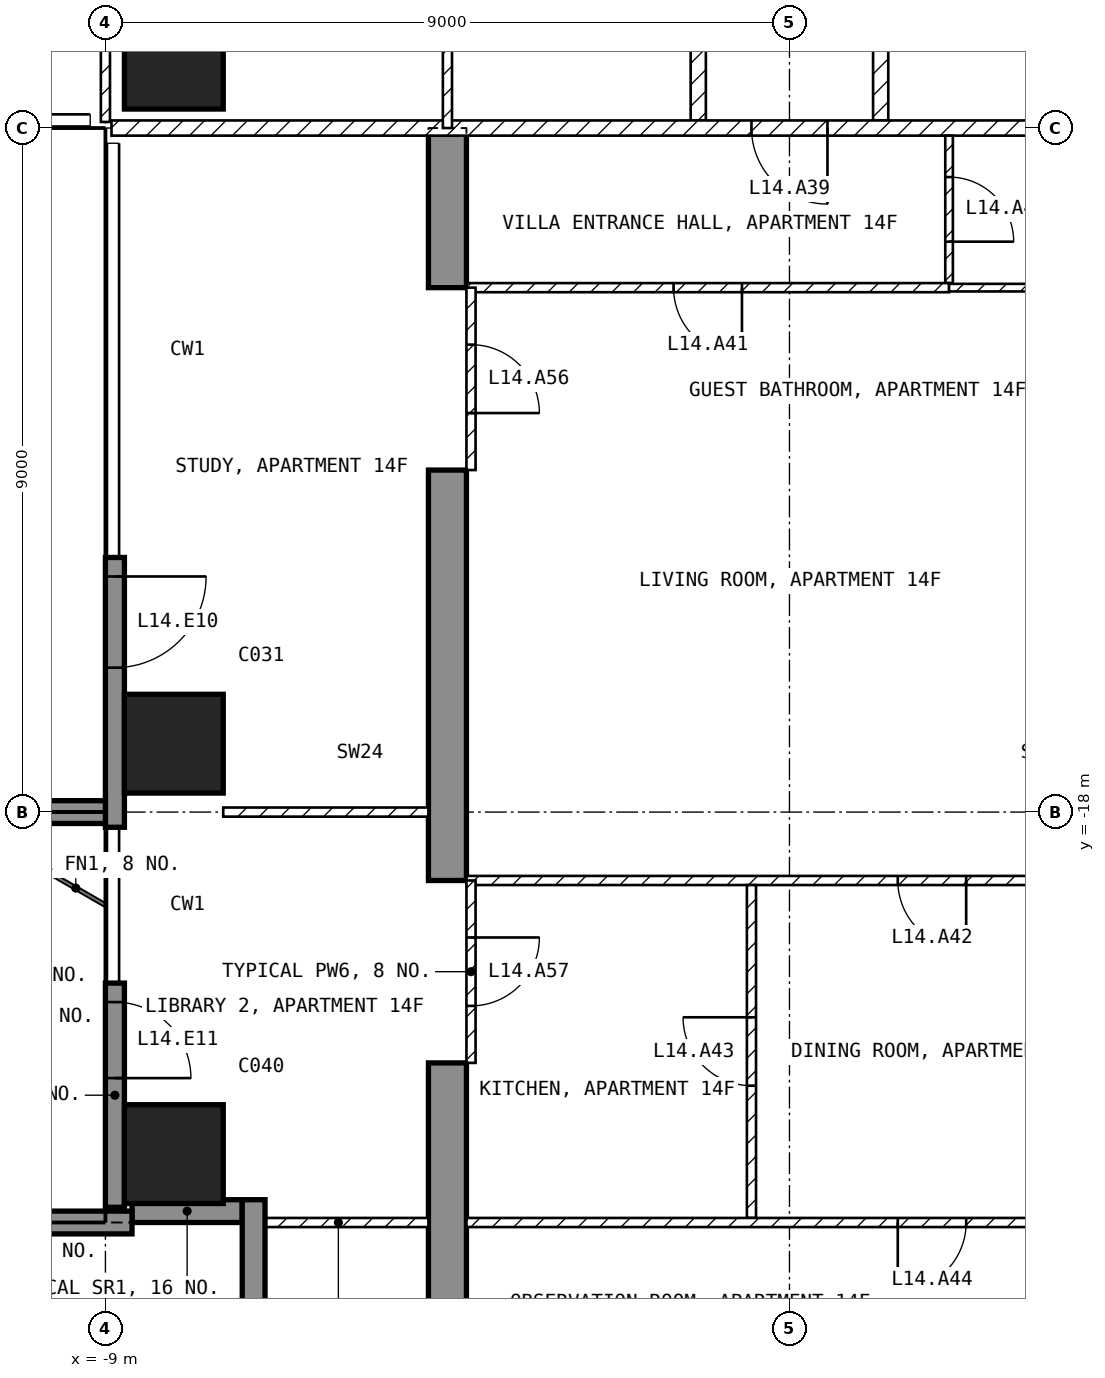
"""IFC4 building model, lengths in metres.
Left out: names, types, materials, properties, quantities, classifications, styles, units other than length and angle.
Written with IfcOpenShell. Run it as: python <this file> out.ifc"""

import sys

from ifc_helpers import new_model, si_unit, direction, frame, frame_2d, origin, origin_2d, place, context, subcontext, project, spatial, polyline, rectangle, outline, extrude, element, fill, save


model = new_model("IFC4")
c1 = context("Model", 3, precision=1e-05, world=origin(), true_north=direction((0.0, 1.0)))
c2 = subcontext(c1, "Body", "Model", "MODEL_VIEW")
j1 = project(units=[si_unit("LENGTHUNIT", "METRE"), si_unit("PLANEANGLEUNIT", "RADIAN")], contexts=[c1])
p1 = place(None, origin())
s1 = spatial("IfcSite", under=j1, at=p1, CompositionType="ELEMENT")
p2 = place(p1, origin())
s2 = spatial("IfcBuilding", under=s1, at=p2, CompositionType="ELEMENT")
p3 = place(p2, frame((0.0, 0.0, 68.0)))
s3 = spatial("IfcBuildingStorey", under=s2, at=p3, CompositionType="ELEMENT", Elevation=68.0)
for number, where, z_axis, x_axis in (
    (1, (-8.1, -22.5, -0.25), (0.0, 0.0, 1.0), (1.0, 0.0, 0.0)),
    (2, (-8.1, -17.1, -0.25), (0.0, 0.0, 1.0), (1.0, 0.0, 0.0)),
    (3, (-8.1, -8.1, -0.25), (0.0, 0.0, 1.0), (1.0, 0.0, 0.0)),
):
    element("IfcColumn", number, at=place(p3, frame(where, z_axis=z_axis, x_axis=x_axis)), inside=s3, PredefinedType="COLUMN", context=c2, shape_type="SweptSolid", body=[
        extrude(rectangle(XDim=1.3, YDim=1.3, at=origin_2d()), origin(), (0.0, 0.0, 1.0), 3.5),
    ])
p4 = place(p3, frame((-4.75, -25.45, -0.25), z_axis=(1.0, 0.0, 0.0), x_axis=(0.0, 1.0, 0.0)))
e4 = element("IfcWall", 4, at=p4, inside=s3, PredefinedType="SHEAR", context=c2, shape_type="SweptSolid", body=[
    extrude(outline(polyline([(0.0, 0.0), (4.15, 0.0), (4.15, 2.65), (6.55, 2.65), (6.55, 0.0), (11.95, 0.0), (11.95, 2.65), (14.35, 2.65), (14.35, 0.0), (16.45, 0.0), (16.45, 3.5), (0.0, 3.5), (0.0, 0.0)])), origin(), (0.0, 0.0, 1.0), 0.5),
])
p5 = place(p3, frame((-8.875, -14.65, 0.0), z_axis=(0.0, 0.0, 1.0), x_axis=(0.0, -1.0, 0.0)))
e5 = element("IfcWall", 5, at=p5, inside=s3, PredefinedType="SOLIDWALL", context=c2, shape_type="SweptSolid", body=[
    extrude(rectangle(XDim=3.55, YDim=0.25, at=frame_2d((1.775, 0.0))), origin(), (0.0, 0.0, 1.0), 3.25),
])
p6 = place(p5, frame((0.25, 0.0, 0.0)))
e6 = element("IfcOpeningElement", 6, at=p6, cuts=e5, PredefinedType="OPENING", context=c2, shape_type="SweptSolid", body=[
    extrude(rectangle(XDim=1.2, YDim=2.4, at=frame_2d((0.6, 1.2))), frame((0.0, 0.135, 0.0), z_axis=(0.0, -1.0, 0.0), x_axis=(1.0, 0.0, 0.0)), (0.0, 0.0, 1.0), 0.27),
])
p7 = place(p3, frame((-8.875, -20.25, 0.0), z_axis=(0.0, 0.0, 1.0), x_axis=(0.0, -1.0, 0.0)))
e7 = element("IfcWall", 7, at=p7, inside=s3, PredefinedType="SOLIDWALL", context=c2, shape_type="SweptSolid", body=[
    extrude(rectangle(XDim=2.95, YDim=0.25, at=frame_2d((1.475, 0.0))), origin(), (0.0, 0.0, 1.0), 3.25),
])
p8 = place(p7, frame((0.25, 0.0, 0.0)))
e8 = element("IfcOpeningElement", 8, at=p8, cuts=e7, PredefinedType="OPENING", context=c2, shape_type="SweptSolid", body=[
    extrude(rectangle(XDim=1.0, YDim=2.4, at=frame_2d((0.5, 1.2))), frame((0.0, 0.135, 0.0), z_axis=(0.0, -1.0, 0.0), x_axis=(1.0, 0.0, 0.0)), (0.0, 0.0, 1.0), 0.27),
])
p9 = place(p3, frame((-8.65, -23.25, 0.0), z_axis=(0.0, 0.0, 1.0), x_axis=(1.0, 0.0, 0.0)))
e9 = element("IfcWall", 9, at=p9, inside=s3, PredefinedType="SOLIDWALL", context=c2, shape_type="SweptSolid", body=[
    extrude(rectangle(XDim=1.45, YDim=0.3, at=frame_2d((0.725, 0.0))), origin(), (0.0, 0.0, 1.0), 3.25),
])
p10 = place(p3, frame((-7.05, -23.1, 0.0), z_axis=(0.0, 0.0, 1.0), x_axis=(0.0, -1.0, 0.0)))
e10 = element("IfcWall", 10, at=p10, inside=s3, PredefinedType="SOLIDWALL", context=c2, shape_type="SweptSolid", body=[
    extrude(rectangle(XDim=1.8, YDim=0.3, at=frame_2d((0.9, 0.0))), origin(), (0.0, 0.0, 1.0), 3.25),
])
p11 = place(p3, frame((-8.65, -23.4, 0.0), z_axis=(0.0, 0.0, 1.0), x_axis=(-1.0, 0.0, 0.0)))
e11 = element("IfcWall", 11, at=p11, inside=s3, PredefinedType="SOLIDWALL", context=c2, shape_type="SweptSolid", body=[
    extrude(rectangle(XDim=3.05, YDim=0.3, at=frame_2d((1.525, 0.0))), origin(), (0.0, 0.0, 1.0), 3.25),
])
p12 = place(p3, frame((-9.0, -18.0, 0.0), z_axis=(0.0, 0.0, 1.0), x_axis=(-1.0, 0.0, 0.0)))
e12 = element("IfcWall", 12, at=p12, inside=s3, PredefinedType="SOLIDWALL", context=c2, shape_type="SweptSolid", body=[
    extrude(rectangle(XDim=2.7, YDim=0.3, at=frame_2d((1.35, 0.0))), origin(), (0.0, 0.0, 1.0), 3.25),
])
for number, where, z_axis, x_axis in (
    (13, (1.2, -1.3, 0.0), (0.0, 0.0, 1.0), (0.0, -1.0, 0.0)),
    (14, (-1.2, -8.9, 0.0), (0.0, 0.0, 1.0), (0.0, 1.0, 0.0)),
):
    element("IfcWall", number, at=place(p3, frame(where, z_axis=z_axis, x_axis=x_axis)), inside=s3, PredefinedType="PARTITIONING", context=c2, shape_type="SweptSolid", body=[
        extrude(rectangle(XDim=7.6, YDim=0.2, at=frame_2d((3.8, 0.0))), origin(), (0.0, 0.0, 1.0), 3.25),
    ])
p13 = place(p3, frame((8.92, -9.0, 0.0), z_axis=(0.0, 0.0, 1.0), x_axis=(-1.0, 0.0, 0.0)))
e15 = element("IfcWall", 15, at=p13, inside=s3, PredefinedType="PARTITIONING", context=c2, shape_type="SweptSolid", body=[
    extrude(rectangle(XDim=17.84, YDim=0.2, at=frame_2d((8.92, 0.0))), origin(), (0.0, 0.0, 1.0), 3.25),
])
p14 = place(p13, frame((8.42, 0.0, 0.0)))
e16 = element("IfcOpeningElement", 16, at=p14, cuts=e15, PredefinedType="OPENING", context=c2, shape_type="SweptSolid", body=[
    extrude(rectangle(XDim=1.0, YDim=2.1, at=frame_2d((0.5, 1.05))), frame((0.0, 0.11, 0.0), z_axis=(0.0, -1.0, 0.0), x_axis=(1.0, 0.0, 0.0)), (0.0, 0.0, 1.0), 0.22),
])
p15 = place(p3, frame((-9.0, -1.3, 0.0), z_axis=(0.0, 0.0, 1.0), x_axis=(0.0, -1.0, 0.0)))
e17 = element("IfcWall", 17, at=p15, inside=s3, PredefinedType="PARTITIONING", context=c2, shape_type="SweptSolid", body=[
    extrude(rectangle(XDim=7.62, YDim=0.12, at=frame_2d((3.81, 0.0))), origin(), (0.0, 0.0, 1.0), 3.25),
])
p16 = place(p15, frame((0.85, 0.0, 0.0)))
e18 = element("IfcOpeningElement", 18, at=p16, cuts=e17, PredefinedType="OPENING", context=c2, shape_type="SweptSolid", body=[
    extrude(rectangle(XDim=0.9, YDim=2.1, at=frame_2d((0.45, 1.05))), frame((0.0, 0.07, 0.0), z_axis=(0.0, -1.0, 0.0), x_axis=(1.0, 0.0, 0.0)), (0.0, 0.0, 1.0), 0.14),
])
p17 = place(p3, frame((-4.5, -1.3, 0.0), z_axis=(0.0, 0.0, 1.0), x_axis=(0.0, -1.0, 0.0)))
e19 = element("IfcWall", 19, at=p17, inside=s3, PredefinedType="PARTITIONING", context=c2, shape_type="SweptSolid", body=[
    extrude(rectangle(XDim=7.7, YDim=0.12, at=frame_2d((3.85, 0.0))), origin(), (0.0, 0.0, 1.0), 3.25),
])
p18 = place(p17, frame((1.84, 0.0, 0.0)))
e20 = element("IfcOpeningElement", 20, at=p18, cuts=e19, PredefinedType="OPENING", context=c2, shape_type="SweptSolid", body=[
    extrude(rectangle(XDim=0.9, YDim=2.1, at=frame_2d((0.45, 1.05))), frame((0.0, 0.07, 0.0), z_axis=(0.0, -1.0, 0.0), x_axis=(1.0, 0.0, 0.0)), (0.0, 0.0, 1.0), 0.14),
])
p19 = place(p3, frame((2.1, -9.1, 0.0), z_axis=(0.0, 0.0, 1.0), x_axis=(0.0, -1.0, 0.0)))
e21 = element("IfcWall", 21, at=p19, inside=s3, PredefinedType="PARTITIONING", context=c2, shape_type="SweptSolid", body=[
    extrude(rectangle(XDim=1.94, YDim=0.1, at=frame_2d((0.97, 0.0))), origin(), (0.0, 0.0, 1.0), 3.25),
])
p20 = place(p19, frame((0.545, 0.0, 0.0)))
e22 = element("IfcOpeningElement", 22, at=p20, cuts=e21, PredefinedType="OPENING", context=c2, shape_type="SweptSolid", body=[
    extrude(rectangle(XDim=0.85, YDim=2.1, at=frame_2d((0.425, 1.05))), frame((0.0, 0.06, 0.0), z_axis=(0.0, -1.0, 0.0), x_axis=(1.0, 0.0, 0.0)), (0.0, 0.0, 1.0), 0.12),
])
p21 = place(p3, frame((2.1, -11.1, 0.0), z_axis=(0.0, 0.0, 1.0), x_axis=(-1.0, 0.0, 0.0)))
e23 = element("IfcWall", 23, at=p21, inside=s3, PredefinedType="PARTITIONING", context=c2, shape_type="SweptSolid", body=[
    extrude(rectangle(XDim=6.35, YDim=0.12, at=frame_2d((3.175, 0.0))), origin(), (0.0, 0.0, 1.0), 3.25),
])
p22 = place(p21, frame((2.725, 0.0, 0.0)))
e24 = element("IfcOpeningElement", 24, at=p22, cuts=e23, PredefinedType="OPENING", context=c2, shape_type="SweptSolid", body=[
    extrude(rectangle(XDim=0.9, YDim=2.1, at=frame_2d((0.45, 1.05))), frame((0.0, 0.07, 0.0), z_axis=(0.0, -1.0, 0.0), x_axis=(1.0, 0.0, 0.0)), (0.0, 0.0, 1.0), 0.14),
])
p23 = place(p3, frame((4.25, -11.1, 0.0), z_axis=(0.0, 0.0, 1.0), x_axis=(-1.0, 0.0, 0.0)))
e25 = element("IfcWall", 25, at=p23, inside=s3, PredefinedType="PARTITIONING", context=c2, shape_type="SweptSolid", body=[
    extrude(rectangle(XDim=2.15, YDim=0.1, at=frame_2d((1.075, 0.0))), origin(), (0.0, 0.0, 1.0), 3.25),
])
p24 = place(p3, frame((4.25, -18.9, 0.0), z_axis=(0.0, 0.0, 1.0), x_axis=(-1.0, 0.0, 0.0)))
e26 = element("IfcWall", 26, at=p24, inside=s3, PredefinedType="PARTITIONING", context=c2, shape_type="SweptSolid", body=[
    extrude(rectangle(XDim=8.5, YDim=0.12, at=frame_2d((4.25, 0.0))), origin(), (0.0, 0.0, 1.0), 3.25),
])
p25 = place(p24, frame((1.925, 0.0, 0.0)))
e27 = element("IfcOpeningElement", 27, at=p25, cuts=e26, PredefinedType="OPENING", context=c2, shape_type="SweptSolid", body=[
    extrude(rectangle(XDim=0.9, YDim=2.1, at=frame_2d((0.45, 1.05))), frame((0.0, 0.07, 0.0), z_axis=(0.0, -1.0, 0.0), x_axis=(1.0, 0.0, 0.0)), (0.0, 0.0, 1.0), 0.14),
])
p26 = place(p3, frame((-0.5, -23.34, 0.0), z_axis=(0.0, 0.0, 1.0), x_axis=(0.0, 1.0, 0.0)))
e28 = element("IfcWall", 28, at=p26, inside=s3, PredefinedType="PARTITIONING", context=c2, shape_type="SweptSolid", body=[
    extrude(rectangle(XDim=4.38, YDim=0.12, at=frame_2d((2.19, 0.0))), origin(), (0.0, 0.0, 1.0), 3.25),
])
p27 = place(p26, frame((1.74, 0.0, 0.0)))
e29 = element("IfcOpeningElement", 29, at=p27, cuts=e28, PredefinedType="OPENING", context=c2, shape_type="SweptSolid", body=[
    extrude(rectangle(XDim=0.9, YDim=2.1, at=frame_2d((0.45, 1.05))), frame((0.0, 0.07, 0.0), z_axis=(0.0, -1.0, 0.0), x_axis=(1.0, 0.0, 0.0)), (0.0, 0.0, 1.0), 0.14),
])
p28 = place(p3, frame((4.25, -23.4, 0.0), z_axis=(0.0, 0.0, 1.0), x_axis=(-1.0, 0.0, 0.0)))
e30 = element("IfcWall", 30, at=p28, inside=s3, PredefinedType="PARTITIONING", context=c2, shape_type="SweptSolid", body=[
    extrude(rectangle(XDim=8.5, YDim=0.12, at=frame_2d((4.25, 0.0))), origin(), (0.0, 0.0, 1.0), 3.25),
])
p29 = place(p28, frame((1.925, 0.0, 0.0)))
e31 = element("IfcOpeningElement", 31, at=p29, cuts=e30, PredefinedType="OPENING", context=c2, shape_type="SweptSolid", body=[
    extrude(rectangle(XDim=0.9, YDim=2.1, at=frame_2d((0.45, 1.05))), frame((0.0, 0.07, 0.0), z_axis=(0.0, -1.0, 0.0), x_axis=(1.0, 0.0, 0.0)), (0.0, 0.0, 1.0), 0.14),
])
p30 = place(p3, frame((-4.75, -18.0, 0.0), z_axis=(0.0, 0.0, 1.0), x_axis=(-1.0, 0.0, 0.0)))
e32 = element("IfcWall", 32, at=p30, inside=s3, PredefinedType="PARTITIONING", context=c2, shape_type="SweptSolid", body=[
    extrude(rectangle(XDim=2.7, YDim=0.12, at=frame_2d((1.35, 0.0))), origin(), (0.0, 0.0, 1.0), 3.25),
])
p31 = place(p3, frame((-4.75, -23.4, 0.0), z_axis=(0.0, 0.0, 1.0), x_axis=(-1.0, 0.0, 0.0)))
e33 = element("IfcWall", 33, at=p31, inside=s3, PredefinedType="PARTITIONING", context=c2, shape_type="SweptSolid", body=[
    extrude(rectangle(XDim=2.37, YDim=0.12, at=frame_2d((1.185, 0.0))), origin(), (0.0, 0.0, 1.0), 3.25),
])
p32 = place(p3, frame((-4.19, -11.1, 0.0), z_axis=(0.0, 0.0, 1.0), x_axis=(0.0, -1.0, 0.0)))
e34 = element("IfcWall", 34, at=p32, inside=s3, PredefinedType="PARTITIONING", context=c2, shape_type="SweptSolid", body=[
    extrude(rectangle(XDim=2.4, YDim=0.12, at=frame_2d((1.2, 0.0))), origin(), (0.0, 0.0, 1.0), 2.4),
])
p33 = place(p32, frame((0.75, 0.0, 0.0)))
e35 = element("IfcOpeningElement", 35, at=p33, cuts=e34, PredefinedType="OPENING", context=c2, shape_type="SweptSolid", body=[
    extrude(rectangle(XDim=0.9, YDim=2.1, at=frame_2d((0.45, 1.05))), frame((0.0, 0.07, 0.0), z_axis=(0.0, -1.0, 0.0), x_axis=(1.0, 0.0, 0.0)), (0.0, 0.0, 1.0), 0.14),
])
p34 = place(p3, frame((-4.19, -18.9, 0.0), z_axis=(0.0, 0.0, 1.0), x_axis=(0.0, -1.0, 0.0)))
e36 = element("IfcWall", 36, at=p34, inside=s3, PredefinedType="PARTITIONING", context=c2, shape_type="SweptSolid", body=[
    extrude(rectangle(XDim=2.4, YDim=0.12, at=frame_2d((1.2, 0.0))), origin(), (0.0, 0.0, 1.0), 2.4),
])
p35 = place(p34, frame((0.75, 0.0, 0.0)))
e37 = element("IfcOpeningElement", 37, at=p35, cuts=e36, PredefinedType="OPENING", context=c2, shape_type="SweptSolid", body=[
    extrude(rectangle(XDim=0.9, YDim=2.1, at=frame_2d((0.45, 1.05))), frame((0.0, 0.07, 0.0), z_axis=(0.0, -1.0, 0.0), x_axis=(1.0, 0.0, 0.0)), (0.0, 0.0, 1.0), 0.14),
])
p36 = place(p6, origin())
e38 = element("IfcDoor", 38, at=p36, inside=s3, OperationType="SINGLE_SWING_LEFT", PredefinedType="DOOR", context=c2, shape_type="SweptSolid", body=[
    extrude(rectangle(XDim=1.2, YDim=2.4, at=frame_2d((0.6, 1.2))), frame((0.0, 0.025, 0.0), z_axis=(0.0, -1.0, 0.0), x_axis=(1.0, 0.0, 0.0)), (0.0, 0.0, 1.0), 0.05),
])
fill(e6, e38)
p37 = place(p8, origin())
e39 = element("IfcDoor", 39, at=p37, inside=s3, OperationType="SINGLE_SWING_RIGHT", PredefinedType="DOOR", context=c2, shape_type="SweptSolid", body=[
    extrude(rectangle(XDim=1.0, YDim=2.4, at=frame_2d((0.5, 1.2))), frame((0.0, 0.025, 0.0), z_axis=(0.0, -1.0, 0.0), x_axis=(1.0, 0.0, 0.0)), (0.0, 0.0, 1.0), 0.05),
])
fill(e8, e39)
p38 = place(p14, origin())
e40 = element("IfcDoor", 40, at=p38, inside=s3, OperationType="SINGLE_SWING_LEFT", PredefinedType="DOOR", context=c2, shape_type="SweptSolid", body=[
    extrude(rectangle(XDim=1.0, YDim=2.1, at=frame_2d((0.5, 1.05))), frame((0.0, 0.025, 0.0), z_axis=(0.0, -1.0, 0.0), x_axis=(1.0, 0.0, 0.0)), (0.0, 0.0, 1.0), 0.05),
])
fill(e16, e40)
p39 = place(p20, origin())
e41 = element("IfcDoor", 41, at=p39, inside=s3, OperationType="SINGLE_SWING_RIGHT", PredefinedType="DOOR", context=c2, shape_type="SweptSolid", body=[
    extrude(rectangle(XDim=0.85, YDim=2.1, at=frame_2d((0.425, 1.05))), frame((0.0, 0.025, 0.0), z_axis=(0.0, -1.0, 0.0), x_axis=(1.0, 0.0, 0.0)), (0.0, 0.0, 1.0), 0.05),
])
fill(e22, e41)
p40 = place(p22, origin())
e42 = element("IfcDoor", 42, at=p40, inside=s3, OperationType="SINGLE_SWING_LEFT", PredefinedType="DOOR", context=c2, shape_type="SweptSolid", body=[
    extrude(rectangle(XDim=0.9, YDim=2.1, at=frame_2d((0.45, 1.05))), frame((0.0, 0.025, 0.0), z_axis=(0.0, -1.0, 0.0), x_axis=(1.0, 0.0, 0.0)), (0.0, 0.0, 1.0), 0.05),
])
fill(e24, e42)
p41 = place(p25, origin())
e43 = element("IfcDoor", 43, at=p41, inside=s3, OperationType="SINGLE_SWING_LEFT", PredefinedType="DOOR", context=c2, shape_type="SweptSolid", body=[
    extrude(rectangle(XDim=0.9, YDim=2.1, at=frame_2d((0.45, 1.05))), frame((0.0, 0.025, 0.0), z_axis=(0.0, -1.0, 0.0), x_axis=(1.0, 0.0, 0.0)), (0.0, 0.0, 1.0), 0.05),
])
fill(e27, e43)
p42 = place(p27, origin())
e44 = element("IfcDoor", 44, at=p42, inside=s3, OperationType="SINGLE_SWING_RIGHT", PredefinedType="DOOR", context=c2, shape_type="SweptSolid", body=[
    extrude(rectangle(XDim=0.9, YDim=2.1, at=frame_2d((0.45, 1.05))), frame((0.0, 0.025, 0.0), z_axis=(0.0, -1.0, 0.0), x_axis=(1.0, 0.0, 0.0)), (0.0, 0.0, 1.0), 0.05),
])
fill(e29, e44)
p43 = place(p29, origin())
e45 = element("IfcDoor", 45, at=p43, inside=s3, OperationType="SINGLE_SWING_RIGHT", PredefinedType="DOOR", context=c2, shape_type="SweptSolid", body=[
    extrude(rectangle(XDim=0.9, YDim=2.1, at=frame_2d((0.45, 1.05))), frame((0.0, 0.025, 0.0), z_axis=(0.0, -1.0, 0.0), x_axis=(1.0, 0.0, 0.0)), (0.0, 0.0, 1.0), 0.05),
])
fill(e31, e45)
p44 = place(p33, origin())
e46 = element("IfcDoor", 46, at=p44, inside=s3, OperationType="SINGLE_SWING_RIGHT", PredefinedType="DOOR", context=c2, shape_type="SweptSolid", body=[
    extrude(rectangle(XDim=0.9, YDim=2.1, at=frame_2d((0.45, 1.05))), frame((0.0, 0.025, 0.0), z_axis=(0.0, -1.0, 0.0), x_axis=(1.0, 0.0, 0.0)), (0.0, 0.0, 1.0), 0.05),
])
fill(e35, e46)
p45 = place(p35, origin())
e47 = element("IfcDoor", 47, at=p45, inside=s3, OperationType="SINGLE_SWING_LEFT", PredefinedType="DOOR", context=c2, shape_type="SweptSolid", body=[
    extrude(rectangle(XDim=0.9, YDim=2.1, at=frame_2d((0.45, 1.05))), frame((0.0, 0.025, 0.0), z_axis=(0.0, -1.0, 0.0), x_axis=(1.0, 0.0, 0.0)), (0.0, 0.0, 1.0), 0.05),
])
fill(e37, e47)
save(model, sys.argv[1])
